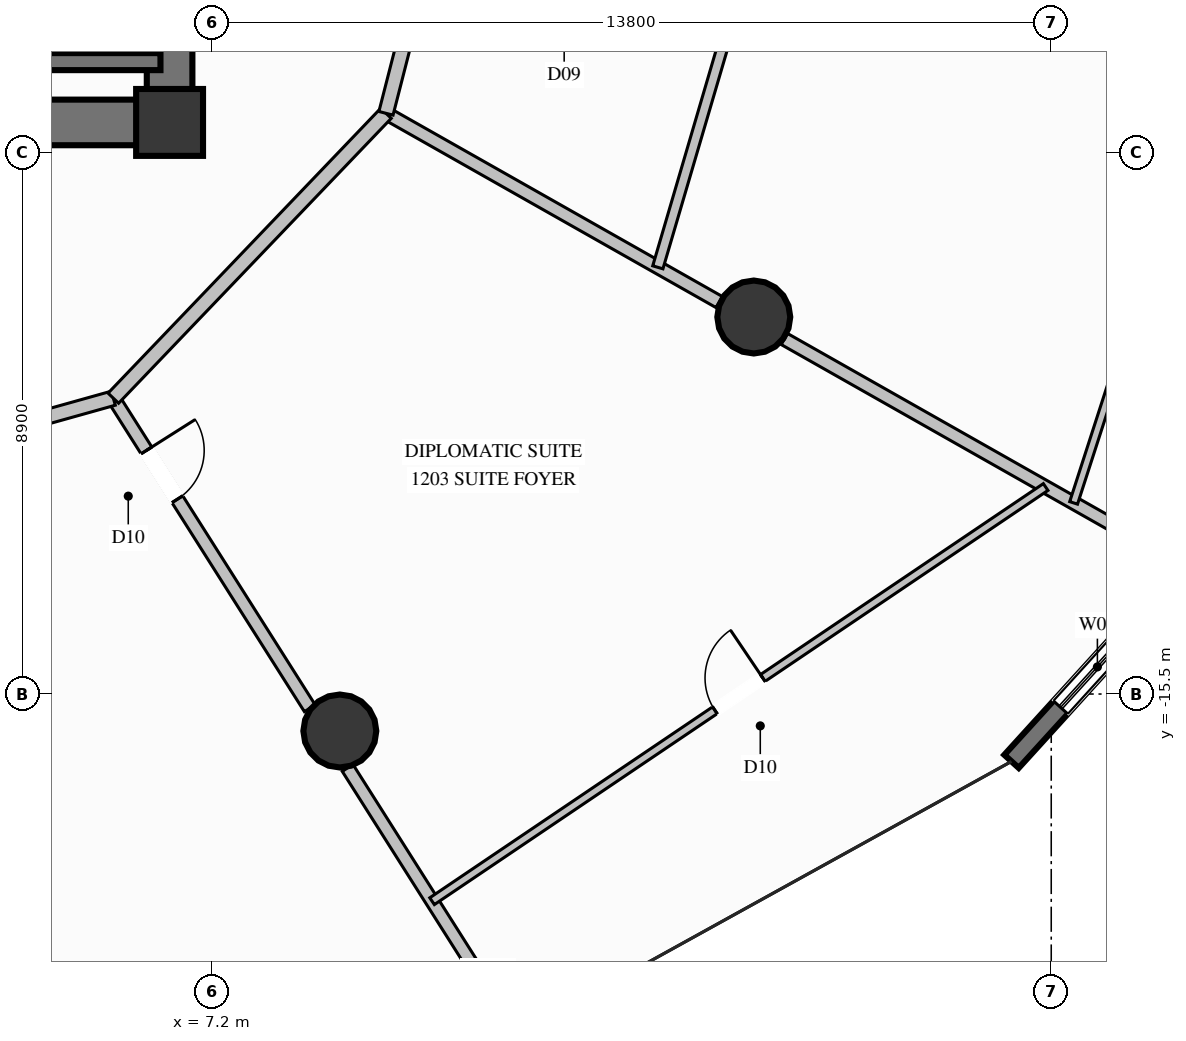
"""IFC4 building model, lengths in metres.
Left out: names, types, materials, properties, quantities, classifications, styles, units other than length and angle.
Written with IfcOpenShell. Run it as: python <this file> out.ifc"""

import sys

from ifc_helpers import new_model, si_unit, direction, frame, frame_2d, origin, origin_2d, place, context, subcontext, project, spatial, rectangle, circle, extrude, element, fill, save


model = new_model("IFC4")
c1 = context("Model", 3, precision=1e-05, world=origin(), true_north=direction((0.0, 1.0)))
c2 = subcontext(c1, "Body", "Model", "MODEL_VIEW")
j1 = project(units=[si_unit("LENGTHUNIT", "METRE"), si_unit("PLANEANGLEUNIT", "RADIAN")], contexts=[c1])
p1 = place(None, origin())
s1 = spatial("IfcSite", under=j1, at=p1, CompositionType="ELEMENT")
p2 = place(p1, origin())
s2 = spatial("IfcBuilding", under=s1, at=p2, CompositionType="ELEMENT")
p3 = place(p2, frame((0.0, 0.0, 46.4)))
s3 = spatial("IfcBuildingStorey", under=s2, at=p3, CompositionType="ELEMENT", Elevation=46.4)
p4 = place(p3, frame((6.5, -6.1, 0.0), z_axis=(0.0, 0.0, 1.0), x_axis=(1.0, 0.0, 0.0)))
e1 = element("IfcColumn", 1, at=p4, inside=s3, PredefinedType="COLUMN", context=c2, shape_type="SweptSolid", body=[
    extrude(rectangle(XDim=1.1, YDim=1.1, at=origin_2d()), origin(), (0.0, 0.0, 1.0), 3.6),
])
p5 = place(p3, frame((4.15, -6.1, 0.0), z_axis=(0.0, 0.0, 1.0), x_axis=(1.0, 0.0, 0.0)))
e2 = element("IfcWall", 2, at=p5, inside=s3, PredefinedType="SHEAR", context=c2, shape_type="SweptSolid", body=[
    extrude(rectangle(XDim=1.975, YDim=0.75, at=frame_2d((0.988, 0.0))), origin(), (0.0, 0.0, 1.0), 3.6),
])
p6 = place(p3, frame((6.5, -6.475, 0.0), z_axis=(0.0, 0.0, 1.0), x_axis=(0.0, 1.0, 0.0)))
e3 = element("IfcWall", 3, at=p6, inside=s3, PredefinedType="SHEAR", context=c2, shape_type="SweptSolid", body=[
    extrude(rectangle(XDim=4.125, YDim=0.75, at=frame_2d((2.062, 0.0))), origin(), (0.0, 0.0, 1.0), 3.6),
])
for number, where, z_axis, x_axis in (
    (4, (9.3, -16.108, 0.0), (0.0, 0.0, 1.0), (1.0, 0.0, 0.0)),
    (5, (16.108, -9.3, 0.0), (0.0, 0.0, 1.0), (1.0, 0.0, 0.0)),
):
    element("IfcColumn", number, at=place(p3, frame(where, z_axis=z_axis, x_axis=x_axis)), inside=s3, PredefinedType="COLUMN", context=c2, shape_type="SweptSolid", body=[
        extrude(circle(Radius=0.6, at=origin_2d()), origin(), (0.0, 0.0, 1.0), 3.6),
    ])
p7 = place(p3, frame((25.211, -11.255, 0.0), z_axis=(0.0, 0.0, 1.0), x_axis=(-0.672493004141, -0.740103478833, 0.0)))
e6 = element("IfcWall", 6, at=p7, inside=s3, PredefinedType="SOLIDWALL", context=c2, shape_type="SweptSolid", body=[
    extrude(rectangle(XDim=7.233, YDim=0.32, at=frame_2d((3.616, 0.0))), origin(), (0.0, 0.0, 1.0), 3.34),
])
p8 = place(p7, frame((4.233, 0.0, 0.35)))
e7 = element("IfcOpeningElement", 7, at=p8, cuts=e6, PredefinedType="OPENING", context=c2, shape_type="SweptSolid", body=[
    extrude(rectangle(XDim=1.8, YDim=2.6, at=frame_2d((0.9, 1.3))), frame((0.0, 0.17, 0.0), z_axis=(0.0, -1.0, 0.0), x_axis=(1.0, 0.0, 0.0)), (0.0, 0.0, 1.0), 0.34),
])
p9 = place(p3, frame((4.15, -5.1, 0.0), z_axis=(0.0, 0.0, 1.0), x_axis=(1.0, 0.0, 0.0)))
e8 = element("IfcWall", 8, at=p9, inside=s3, PredefinedType="SOLIDWALL", context=c2, shape_type="SweptSolid", body=[
    extrude(rectangle(XDim=2.2, YDim=0.28, at=frame_2d((1.1, 0.0))), origin(), (0.0, 0.0, 1.0), 3.34),
])
p10 = place(p3, frame((5.575, -10.635, 0.0), z_axis=(0.0, 0.0, 1.0), x_axis=(0.535249320239, -0.844694125222, 0.0)))
e9 = element("IfcWall", 9, at=p10, inside=s3, PredefinedType="PARTITIONING", context=c2, shape_type="SweptSolid", body=[
    extrude(rectangle(XDim=6.036, YDim=0.21, at=frame_2d((3.018, 0.0))), origin(), (0.0, 0.0, 1.0), 2.709),
])
p11 = place(p10, frame((1.017, 0.0, 0.0)))
e10 = element("IfcOpeningElement", 10, at=p11, cuts=e9, PredefinedType="OPENING", context=c2, shape_type="SweptSolid", body=[
    extrude(rectangle(XDim=0.95, YDim=2.1, at=frame_2d((0.475, 1.05))), frame((0.0, 0.115, 0.0), z_axis=(0.0, -1.0, 0.0), x_axis=(1.0, 0.0, 0.0)), (0.0, 0.0, 1.0), 0.23),
])
p12 = place(p3, frame((9.428, -16.715, 0.0), z_axis=(0.0, 0.0, 1.0), x_axis=(0.535234793796, -0.84470332988, 0.0)))
e11 = element("IfcWall", 11, at=p12, inside=s3, PredefinedType="PARTITIONING", context=c2, shape_type="SweptSolid", body=[
    extrude(rectangle(XDim=4.673, YDim=0.21, at=frame_2d((2.336, 0.0))), origin(), (0.0, 0.0, 1.0), 3.34),
])
p13 = place(p3, frame((10.059, -5.95, 0.0), z_axis=(0.0, 0.0, 1.0), x_axis=(0.870111959412, -0.492854114407, 0.0)))
e12 = element("IfcWall", 12, at=p13, inside=s3, PredefinedType="PARTITIONING", context=c2, shape_type="SweptSolid", body=[
    extrude(rectangle(XDim=6.298, YDim=0.21, at=frame_2d((3.149, 0.0))), origin(), (0.0, 0.0, 1.0), 2.709),
])
p14 = place(p3, frame((16.611, -9.662, 0.0), z_axis=(0.0, 0.0, 1.0), x_axis=(0.870079719998, -0.492911027314, 0.0)))
e13 = element("IfcWall", 13, at=p14, inside=s3, PredefinedType="PARTITIONING", context=c2, shape_type="SweptSolid", body=[
    extrude(rectangle(XDim=7.583, YDim=0.21, at=frame_2d((3.792, 0.0))), origin(), (0.0, 0.0, 1.0), 3.34),
])
p15 = place(p3, frame((-0.55, -12.35, 0.0), z_axis=(0.0, 0.0, 1.0), x_axis=(0.962960431872, 0.269642738915, 0.0)))
e14 = element("IfcWall", 14, at=p15, inside=s3, PredefinedType="PARTITIONING", context=c2, shape_type="SweptSolid", body=[
    extrude(rectangle(XDim=6.361, YDim=0.24, at=frame_2d((3.18, 0.0))), origin(), (0.0, 0.0, 1.0), 3.34),
])
p16 = place(p3, frame((5.575, -10.635, 0.0), z_axis=(0.0, 0.0, 1.0), x_axis=(0.691445702336, 0.722428432941, 0.0)))
e15 = element("IfcWall", 15, at=p16, inside=s3, PredefinedType="PARTITIONING", context=c2, shape_type="SweptSolid", body=[
    extrude(rectangle(XDim=6.485, YDim=0.24, at=frame_2d((3.243, 0.0))), origin(), (0.0, 0.0, 1.0), 3.34),
])
p17 = place(p3, frame((10.817, -18.907, 0.0), z_axis=(0.0, 0.0, 1.0), x_axis=(0.828865179629, 0.559448401551, 0.0)))
e16 = element("IfcWall", 16, at=p17, inside=s3, PredefinedType="PARTITIONING", context=c2, shape_type="SweptSolid", body=[
    extrude(rectangle(XDim=12.175, YDim=0.135, at=frame_2d((6.087, 0.0))), origin(), (0.0, 0.0, 1.0), 3.34),
])
p18 = place(p17, frame((5.612, 0.0, 0.0)))
e17 = element("IfcOpeningElement", 17, at=p18, cuts=e16, PredefinedType="OPENING", context=c2, shape_type="SweptSolid", body=[
    extrude(rectangle(XDim=0.95, YDim=2.1, at=frame_2d((0.475, 1.05))), frame((0.0, 0.078, 0.0), z_axis=(0.0, -1.0, 0.0), x_axis=(1.0, 0.0, 0.0)), (0.0, 0.0, 1.0), 0.155),
])
p19 = place(p3, frame((10.059, -5.95, 0.0), z_axis=(0.0, 0.0, 1.0), x_axis=(0.248286444079, 0.968686658154, 0.0)))
e18 = element("IfcWall", 18, at=p19, inside=s3, PredefinedType="PARTITIONING", context=c2, shape_type="SweptSolid", body=[
    extrude(rectangle(XDim=2.775, YDim=0.24, at=frame_2d((1.387, 0.0))), origin(), (0.0, 0.0, 1.0), 3.34),
])
p20 = place(p3, frame((14.53, -8.483, 0.0), z_axis=(0.0, 0.0, 1.0), x_axis=(0.281994391394, 0.959416053244, 0.0)))
e19 = element("IfcWall", 19, at=p20, inside=s3, PredefinedType="PLUMBINGWALL", context=c2, shape_type="SweptSolid", body=[
    extrude(rectangle(XDim=3.844, YDim=0.175, at=frame_2d((1.922, 0.0))), origin(), (0.0, 0.0, 1.0), 3.34),
])
p21 = place(p3, frame((21.368, -12.357, 0.0), z_axis=(0.0, 0.0, 1.0), x_axis=(0.307945762787, 0.951403913793, 0.0)))
e20 = element("IfcWall", 20, at=p21, inside=s3, PredefinedType="PARTITIONING", context=c2, shape_type="SweptSolid", body=[
    extrude(rectangle(XDim=13.054, YDim=0.135, at=frame_2d((6.527, 0.0))), origin(), (0.0, 0.0, 1.0), 3.34),
])
p22 = place(p21, frame((6.052, 0.0, 0.0)))
e21 = element("IfcOpeningElement", 21, at=p22, cuts=e20, PredefinedType="OPENING", context=c2, shape_type="SweptSolid", body=[
    extrude(rectangle(XDim=0.95, YDim=2.1, at=frame_2d((0.475, 1.05))), frame((0.0, 0.078, 0.0), z_axis=(0.0, -1.0, 0.0), x_axis=(1.0, 0.0, 0.0)), (0.0, 0.0, 1.0), 0.155),
])
p23 = place(p8, origin())
e22 = element("IfcWindow", 22, at=p23, inside=s3, PartitioningType="SINGLE_PANEL", PredefinedType="WINDOW", context=c2, shape_type="SweptSolid", body=[
    extrude(rectangle(XDim=1.8, YDim=2.6, at=frame_2d((0.9, 1.3))), frame((0.0, 0.03, 0.0), z_axis=(0.0, -1.0, 0.0), x_axis=(1.0, 0.0, 0.0)), (0.0, 0.0, 1.0), 0.06),
])
fill(e7, e22)
p24 = place(p11, origin())
e23 = element("IfcDoor", 23, at=p24, inside=s3, OperationType="SINGLE_SWING_LEFT", PredefinedType="DOOR", context=c2, shape_type="SweptSolid", body=[
    extrude(rectangle(XDim=0.95, YDim=2.1, at=frame_2d((0.475, 1.05))), frame((0.0, 0.025, 0.0), z_axis=(0.0, -1.0, 0.0), x_axis=(1.0, 0.0, 0.0)), (0.0, 0.0, 1.0), 0.05),
])
fill(e10, e23)
p25 = place(p18, origin())
e24 = element("IfcDoor", 24, at=p25, inside=s3, OperationType="SINGLE_SWING_RIGHT", PredefinedType="DOOR", context=c2, shape_type="SweptSolid", body=[
    extrude(rectangle(XDim=0.95, YDim=2.1, at=frame_2d((0.475, 1.05))), frame((0.0, 0.025, 0.0), z_axis=(0.0, -1.0, 0.0), x_axis=(1.0, 0.0, 0.0)), (0.0, 0.0, 1.0), 0.05),
])
fill(e17, e24)
save(model, sys.argv[1])
